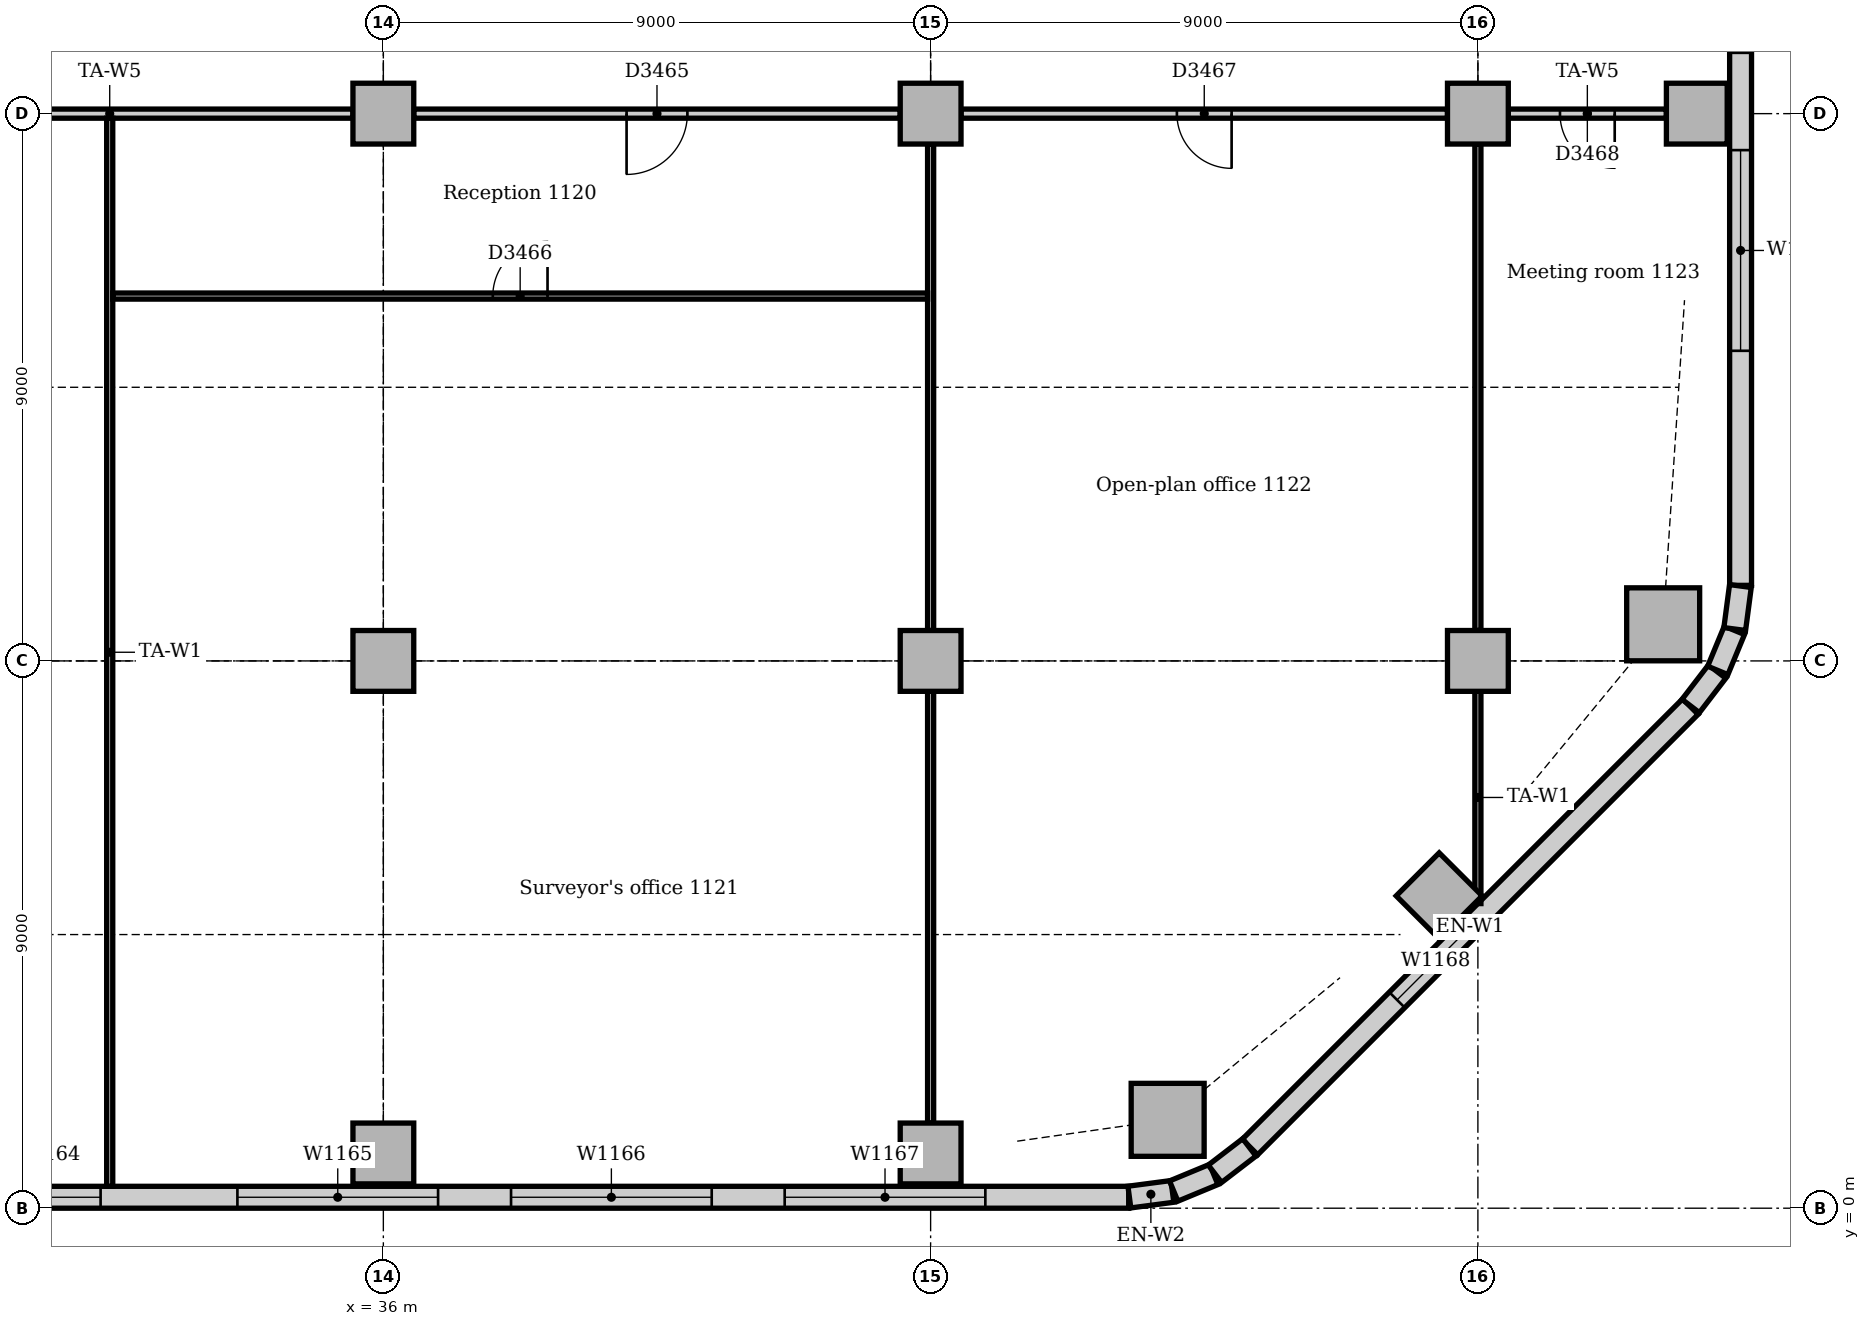
"""IFC4 building model, lengths in metres.
Left out: names, types, materials, properties, quantities, classifications, styles, units other than length and angle.
Written with IfcOpenShell. Run it as: python <this file> out.ifc"""

import sys

from ifc_helpers import new_model, si_unit, direction, frame, frame_2d, origin, origin_2d, place, context, subcontext, project, spatial, rectangle, extrude, element, fill, save


model = new_model("IFC4")
c1 = context("Model", 3, precision=1e-05, world=origin(), true_north=direction((0.0, 1.0)))
c2 = subcontext(c1, "Body", "Model", "MODEL_VIEW")
j1 = project(units=[si_unit("LENGTHUNIT", "METRE"), si_unit("PLANEANGLEUNIT", "RADIAN")], contexts=[c1])
p1 = place(None, origin())
s1 = spatial("IfcSite", under=j1, at=p1, CompositionType="ELEMENT")
p2 = place(p1, origin())
s2 = spatial("IfcBuilding", under=s1, at=p2, CompositionType="ELEMENT")
p3 = place(p2, frame((0.0, 0.0, 51.0)))
s3 = spatial("IfcBuildingStorey", under=s2, at=p3, CompositionType="ELEMENT", Elevation=51.0)
for number, where, z_axis, x_axis in (
    (1, (48.898, 1.453, 0.0), (0.0, 0.0, 1.0), (1.0, 0.0, 0.0)),
    (2, (57.047, 9.602, 0.0), (0.0, 0.0, 1.0), (1.0, 0.0, 0.0)),
):
    element("IfcColumn", number, at=place(p3, frame(where, z_axis=z_axis, x_axis=x_axis)), inside=s3, PredefinedType="COLUMN", context=c2, shape_type="SweptSolid", body=[
        extrude(rectangle(XDim=1.2, YDim=1.2, at=origin_2d()), origin(), (0.0, 0.0, 1.0), 3.85),
    ])
for number, where, z_axis, x_axis in (
    (3, (36.0, 0.9, 0.0), (0.0, 0.0, 1.0), (1.0, 0.0, 0.0)),
    (4, (45.0, 0.9, 0.0), (0.0, 0.0, 1.0), (1.0, 0.0, 0.0)),
    (5, (53.364, 5.136, 0.0), (0.0, 0.0, 1.0), (0.707, 0.707, 0.0)),
    (6, (57.6, 18.0, 0.0), (0.0, 0.0, 1.0), (1.0, 0.0, 0.0)),
    (7, (36.0, 9.0, 0.0), (0.0, 0.0, 1.0), (1.0, 0.0, 0.0)),
    (8, (36.0, 18.0, 0.0), (0.0, 0.0, 1.0), (1.0, 0.0, 0.0)),
    (9, (45.0, 9.0, 0.0), (0.0, 0.0, 1.0), (1.0, 0.0, 0.0)),
    (10, (45.0, 18.0, 0.0), (0.0, 0.0, 1.0), (1.0, 0.0, 0.0)),
    (11, (54.0, 9.0, 0.0), (0.0, 0.0, 1.0), (1.0, 0.0, 0.0)),
    (12, (54.0, 18.0, 0.0), (0.0, 0.0, 1.0), (1.0, 0.0, 0.0)),
):
    element("IfcColumn", number, at=place(p3, frame(where, z_axis=z_axis, x_axis=x_axis)), inside=s3, PredefinedType="COLUMN", context=c2, shape_type="SweptSolid", body=[
        extrude(rectangle(XDim=1.0, YDim=1.0, at=origin_2d()), origin(), (0.0, 0.0, 1.0), 3.85),
    ])
p4 = place(p3, frame((4.243, 0.18, 0.0), z_axis=(0.0, 0.0, 1.0), x_axis=(1.0, 0.0, 0.0)))
e13 = element("IfcWall", 13, at=p4, inside=s3, PredefinedType="STANDARD", context=c2, shape_type="SweptSolid", body=[
    extrude(rectangle(XDim=44.015, YDim=0.36, at=frame_2d((22.007, 0.0))), origin(), (0.0, 0.0, 1.0), 3.85),
])
p5 = place(p4, frame((2.357, 0.0, 0.9)))
e14 = element("IfcOpeningElement", 14, at=p5, cuts=e13, PredefinedType="OPENING", context=c2, shape_type="SweptSolid", body=[
    extrude(rectangle(XDim=3.3, YDim=1.6, at=frame_2d((1.65, 0.8))), frame((0.0, 0.19, 0.0), z_axis=(0.0, -1.0, 0.0), x_axis=(1.0, 0.0, 0.0)), (0.0, 0.0, 1.0), 0.38),
])
p6 = place(p4, frame((7.307, 0.0, 0.9)))
e15 = element("IfcOpeningElement", 15, at=p6, cuts=e13, PredefinedType="OPENING", context=c2, shape_type="SweptSolid", body=[
    extrude(rectangle(XDim=1.8, YDim=1.6, at=frame_2d((0.9, 0.8))), frame((0.0, 0.19, 0.0), z_axis=(0.0, -1.0, 0.0), x_axis=(1.0, 0.0, 0.0)), (0.0, 0.0, 1.0), 0.38),
])
p7 = place(p4, frame((11.357, 0.0, 0.9)))
e16 = element("IfcOpeningElement", 16, at=p7, cuts=e13, PredefinedType="OPENING", context=c2, shape_type="SweptSolid", body=[
    extrude(rectangle(XDim=3.3, YDim=1.6, at=frame_2d((1.65, 0.8))), frame((0.0, 0.19, 0.0), z_axis=(0.0, -1.0, 0.0), x_axis=(1.0, 0.0, 0.0)), (0.0, 0.0, 1.0), 0.38),
])
p8 = place(p4, frame((15.857, 0.0, 0.9)))
e17 = element("IfcOpeningElement", 17, at=p8, cuts=e13, PredefinedType="OPENING", context=c2, shape_type="SweptSolid", body=[
    extrude(rectangle(XDim=3.3, YDim=1.6, at=frame_2d((1.65, 0.8))), frame((0.0, 0.19, 0.0), z_axis=(0.0, -1.0, 0.0), x_axis=(1.0, 0.0, 0.0)), (0.0, 0.0, 1.0), 0.38),
])
p9 = place(p4, frame((20.357, 0.0, 0.9)))
e18 = element("IfcOpeningElement", 18, at=p9, cuts=e13, PredefinedType="OPENING", context=c2, shape_type="SweptSolid", body=[
    extrude(rectangle(XDim=3.3, YDim=1.6, at=frame_2d((1.65, 0.8))), frame((0.0, 0.19, 0.0), z_axis=(0.0, -1.0, 0.0), x_axis=(1.0, 0.0, 0.0)), (0.0, 0.0, 1.0), 0.38),
])
p10 = place(p4, frame((25.307, 0.0, 0.9)))
e19 = element("IfcOpeningElement", 19, at=p10, cuts=e13, PredefinedType="OPENING", context=c2, shape_type="SweptSolid", body=[
    extrude(rectangle(XDim=1.8, YDim=1.6, at=frame_2d((0.9, 0.8))), frame((0.0, 0.19, 0.0), z_axis=(0.0, -1.0, 0.0), x_axis=(1.0, 0.0, 0.0)), (0.0, 0.0, 1.0), 0.38),
])
p11 = place(p4, frame((29.357, 0.0, 0.9)))
e20 = element("IfcOpeningElement", 20, at=p11, cuts=e13, PredefinedType="OPENING", context=c2, shape_type="SweptSolid", body=[
    extrude(rectangle(XDim=3.3, YDim=1.6, at=frame_2d((1.65, 0.8))), frame((0.0, 0.19, 0.0), z_axis=(0.0, -1.0, 0.0), x_axis=(1.0, 0.0, 0.0)), (0.0, 0.0, 1.0), 0.38),
])
p12 = place(p4, frame((33.857, 0.0, 0.9)))
e21 = element("IfcOpeningElement", 21, at=p12, cuts=e13, PredefinedType="OPENING", context=c2, shape_type="SweptSolid", body=[
    extrude(rectangle(XDim=3.3, YDim=1.6, at=frame_2d((1.65, 0.8))), frame((0.0, 0.19, 0.0), z_axis=(0.0, -1.0, 0.0), x_axis=(1.0, 0.0, 0.0)), (0.0, 0.0, 1.0), 0.38),
])
p13 = place(p4, frame((38.357, 0.0, 0.9)))
e22 = element("IfcOpeningElement", 22, at=p13, cuts=e13, PredefinedType="OPENING", context=c2, shape_type="SweptSolid", body=[
    extrude(rectangle(XDim=3.3, YDim=1.6, at=frame_2d((1.65, 0.8))), frame((0.0, 0.19, 0.0), z_axis=(0.0, -1.0, 0.0), x_axis=(1.0, 0.0, 0.0)), (0.0, 0.0, 1.0), 0.38),
])
p14 = place(p3, frame((50.251, 1.006, 0.0), z_axis=(0.0, 0.0, 1.0), x_axis=(0.707106781187, 0.707106781187, 0.0)))
e23 = element("IfcWall", 23, at=p14, inside=s3, PredefinedType="STANDARD", context=c2, shape_type="SweptSolid", body=[
    extrude(rectangle(XDim=10.243, YDim=0.36, at=frame_2d((5.121, 0.0))), origin(), (0.0, 0.0, 1.0), 3.85),
])
p15 = place(p14, frame((3.421, 0.0, 0.9)))
e24 = element("IfcOpeningElement", 24, at=p15, cuts=e23, PredefinedType="OPENING", context=c2, shape_type="SweptSolid", body=[
    extrude(rectangle(XDim=1.8, YDim=1.6, at=frame_2d((0.9, 0.8))), frame((0.0, 0.19, 0.0), z_axis=(0.0, -1.0, 0.0), x_axis=(1.0, 0.0, 0.0)), (0.0, 0.0, 1.0), 0.38),
])
p16 = place(p3, frame((58.32, 10.243, 0.0), z_axis=(0.0, 0.0, 1.0), x_axis=(0.0, 1.0, 0.0)))
e25 = element("IfcWall", 25, at=p16, inside=s3, PredefinedType="STANDARD", context=c2, shape_type="SweptSolid", body=[
    extrude(rectangle(XDim=24.515, YDim=0.36, at=frame_2d((12.257, 0.0))), origin(), (0.0, 0.0, 1.0), 3.85),
])
p17 = place(p16, frame((3.857, 0.0, 0.9)))
e26 = element("IfcOpeningElement", 26, at=p17, cuts=e25, PredefinedType="OPENING", context=c2, shape_type="SweptSolid", body=[
    extrude(rectangle(XDim=3.3, YDim=1.6, at=frame_2d((1.65, 0.8))), frame((0.0, 0.19, 0.0), z_axis=(0.0, -1.0, 0.0), x_axis=(1.0, 0.0, 0.0)), (0.0, 0.0, 1.0), 0.38),
])
p18 = place(p16, frame((8.757, 0.0, 0.9)))
e27 = element("IfcOpeningElement", 27, at=p18, cuts=e25, PredefinedType="OPENING", context=c2, shape_type="SweptSolid", body=[
    extrude(rectangle(XDim=1.8, YDim=1.6, at=frame_2d((0.9, 0.8))), frame((0.0, 0.19, 0.0), z_axis=(0.0, -1.0, 0.0), x_axis=(1.0, 0.0, 0.0)), (0.0, 0.0, 1.0), 0.38),
])
p19 = place(p16, frame((12.857, 0.0, 0.9)))
e28 = element("IfcOpeningElement", 28, at=p19, cuts=e25, PredefinedType="OPENING", context=c2, shape_type="SweptSolid", body=[
    extrude(rectangle(XDim=3.3, YDim=1.6, at=frame_2d((1.65, 0.8))), frame((0.0, 0.19, 0.0), z_axis=(0.0, -1.0, 0.0), x_axis=(1.0, 0.0, 0.0)), (0.0, 0.0, 1.0), 0.38),
])
p20 = place(p16, frame((17.357, 0.0, 0.9)))
e29 = element("IfcOpeningElement", 29, at=p20, cuts=e25, PredefinedType="OPENING", context=c2, shape_type="SweptSolid", body=[
    extrude(rectangle(XDim=3.3, YDim=1.6, at=frame_2d((1.65, 0.8))), frame((0.0, 0.19, 0.0), z_axis=(0.0, -1.0, 0.0), x_axis=(1.0, 0.0, 0.0)), (0.0, 0.0, 1.0), 0.38),
])
for number, where, z_axis, x_axis in (
    (30, (48.269, 0.183, 0.0), (0.0, 0.0, 1.0), (0.991, 0.131, 0.0)),
    (31, (48.997, 0.282, 0.0), (0.0, 0.0, 1.0), (0.924, 0.383, 0.0)),
):
    element("IfcWall", number, at=place(p3, frame(where, z_axis=z_axis, x_axis=x_axis)), inside=s3, PredefinedType="STANDARD", context=c2, shape_type="SweptSolid", body=[
        extrude(rectangle(XDim=0.713, YDim=0.36, at=frame_2d((0.356, 0.0))), origin(), (0.0, 0.0, 1.0), 3.85),
    ])
for number, where, z_axis, x_axis in (
    (32, (49.675, 0.566, 0.0), (0.0, 0.0, 1.0), (0.793, 0.609, 0.0)),
    (33, (57.5, 8.259, 0.0), (0.0, 0.0, 1.0), (0.609, 0.793, 0.0)),
):
    element("IfcWall", number, at=place(p3, frame(where, z_axis=z_axis, x_axis=x_axis)), inside=s3, PredefinedType="STANDARD", context=c2, shape_type="SweptSolid", body=[
        extrude(rectangle(XDim=0.713, YDim=0.36, at=frame_2d((0.357, 0.0))), origin(), (0.0, 0.0, 1.0), 3.85),
    ])
for number, where, z_axis, x_axis in (
    (34, (57.945, 8.844, 0.0), (0.0, 0.0, 1.0), (0.383, 0.924, 0.0)),
    (35, (58.224, 9.524, 0.0), (0.0, 0.0, 1.0), (0.131, 0.991, 0.0)),
):
    element("IfcWall", number, at=place(p3, frame(where, z_axis=z_axis, x_axis=x_axis)), inside=s3, PredefinedType="STANDARD", context=c2, shape_type="SweptSolid", body=[
        extrude(rectangle(XDim=0.713, YDim=0.36, at=frame_2d((0.356, 0.0))), origin(), (0.0, 0.0, 1.0), 3.85),
    ])
p21 = place(p3, frame((54.5, 18.0, 0.0), z_axis=(0.0, 0.0, 1.0), x_axis=(1.0, 0.0, 0.0)))
e36 = element("IfcWall", 36, at=p21, inside=s3, PredefinedType="PARTITIONING", context=c2, shape_type="SweptSolid", body=[
    extrude(rectangle(XDim=2.6, YDim=0.15, at=frame_2d((1.3, 0.0))), origin(), (0.0, 0.0, 1.0), 3.602),
])
p22 = place(p21, frame((0.85, 0.0, 0.0)))
e37 = element("IfcOpeningElement", 37, at=p22, cuts=e36, PredefinedType="OPENING", context=c2, shape_type="SweptSolid", body=[
    extrude(rectangle(XDim=0.9, YDim=2.1, at=frame_2d((0.45, 1.05))), frame((0.0, 0.085, 0.0), z_axis=(0.0, -1.0, 0.0), x_axis=(1.0, 0.0, 0.0)), (0.0, 0.0, 1.0), 0.17),
])
p23 = place(p3, frame((45.5, 18.0, 0.0), z_axis=(0.0, 0.0, 1.0), x_axis=(1.0, 0.0, 0.0)))
e38 = element("IfcWall", 38, at=p23, inside=s3, PredefinedType="PARTITIONING", context=c2, shape_type="SweptSolid", body=[
    extrude(rectangle(XDim=8.0, YDim=0.15, at=frame_2d((4.0, 0.0))), origin(), (0.0, 0.0, 1.0), 3.15),
])
p24 = place(p23, frame((3.55, 0.0, 0.0)))
e39 = element("IfcOpeningElement", 39, at=p24, cuts=e38, PredefinedType="OPENING", context=c2, shape_type="SweptSolid", body=[
    extrude(rectangle(XDim=0.9, YDim=2.1, at=frame_2d((0.45, 1.05))), frame((0.0, 0.085, 0.0), z_axis=(0.0, -1.0, 0.0), x_axis=(1.0, 0.0, 0.0)), (0.0, 0.0, 1.0), 0.17),
])
p25 = place(p3, frame((36.5, 18.0, 0.0), z_axis=(0.0, 0.0, 1.0), x_axis=(1.0, 0.0, 0.0)))
e40 = element("IfcWall", 40, at=p25, inside=s3, PredefinedType="PARTITIONING", context=c2, shape_type="SweptSolid", body=[
    extrude(rectangle(XDim=8.0, YDim=0.15, at=frame_2d((4.0, 0.0))), origin(), (0.0, 0.0, 1.0), 3.15),
])
p26 = place(p25, frame((3.5, 0.0, 0.0)))
e41 = element("IfcOpeningElement", 41, at=p26, cuts=e40, PredefinedType="OPENING", context=c2, shape_type="SweptSolid", body=[
    extrude(rectangle(XDim=1.0, YDim=2.1, at=frame_2d((0.5, 1.05))), frame((0.0, 0.085, 0.0), z_axis=(0.0, -1.0, 0.0), x_axis=(1.0, 0.0, 0.0)), (0.0, 0.0, 1.0), 0.17),
])
p27 = place(p3, frame((27.5, 18.0, 0.0), z_axis=(0.0, 0.0, 1.0), x_axis=(1.0, 0.0, 0.0)))
e42 = element("IfcWall", 42, at=p27, inside=s3, PredefinedType="PARTITIONING", context=c2, shape_type="SweptSolid", body=[
    extrude(rectangle(XDim=8.0, YDim=0.15, at=frame_2d((4.0, 0.0))), origin(), (0.0, 0.0, 1.0), 3.15),
])
p28 = place(p3, frame((31.5, 0.36, 0.0), z_axis=(0.0, 0.0, 1.0), x_axis=(0.0, 1.0, 0.0)))
e43 = element("IfcWall", 43, at=p28, inside=s3, PredefinedType="PARTITIONING", context=c2, shape_type="SweptSolid", body=[
    extrude(rectangle(XDim=17.565, YDim=0.1, at=frame_2d((8.783, 0.0))), origin(), (0.0, 0.0, 1.0), 3.85),
])
p29 = place(p3, frame((45.0, 1.4, 0.0), z_axis=(0.0, 0.0, 1.0), x_axis=(0.0, 1.0, 0.0)))
e44 = element("IfcWall", 44, at=p29, inside=s3, PredefinedType="PARTITIONING", context=c2, shape_type="SweptSolid", body=[
    extrude(rectangle(XDim=7.1, YDim=0.1, at=frame_2d((3.55, 0.0))), origin(), (0.0, 0.0, 1.0), 3.158),
])
p30 = place(p3, frame((45.0, 9.5, 0.0), z_axis=(0.0, 0.0, 1.0), x_axis=(0.0, 1.0, 0.0)))
e45 = element("IfcWall", 45, at=p30, inside=s3, PredefinedType="PARTITIONING", context=c2, shape_type="SweptSolid", body=[
    extrude(rectangle(XDim=8.0, YDim=0.1, at=frame_2d((4.0, 0.0))), origin(), (0.0, 0.0, 1.0), 3.158),
])
p31 = place(p3, frame((31.55, 15.0, 0.0), z_axis=(0.0, 0.0, 1.0), x_axis=(1.0, 0.0, 0.0)))
e46 = element("IfcWall", 46, at=p31, inside=s3, PredefinedType="PARTITIONING", context=c2, shape_type="SweptSolid", body=[
    extrude(rectangle(XDim=13.4, YDim=0.1, at=frame_2d((6.7, 0.0))), origin(), (0.0, 0.0, 1.0), 3.85),
])
p32 = place(p31, frame((6.25, 0.0, 0.0)))
e47 = element("IfcOpeningElement", 47, at=p32, cuts=e46, PredefinedType="OPENING", context=c2, shape_type="SweptSolid", body=[
    extrude(rectangle(XDim=0.9, YDim=2.1, at=frame_2d((0.45, 1.05))), frame((0.0, 0.06, 0.0), z_axis=(0.0, -1.0, 0.0), x_axis=(1.0, 0.0, 0.0)), (0.0, 0.0, 1.0), 0.12),
])
p33 = place(p3, frame((54.0, 5.009, 0.0), z_axis=(0.0, 0.0, 1.0), x_axis=(0.0, 1.0, 0.0)))
e48 = element("IfcWall", 48, at=p33, inside=s3, PredefinedType="PARTITIONING", context=c2, shape_type="SweptSolid", body=[
    extrude(rectangle(XDim=3.491, YDim=0.1, at=frame_2d((1.745, 0.0))), origin(), (0.0, 0.0, 1.0), 3.652),
])
p34 = place(p3, frame((54.0, 9.5, 0.0), z_axis=(0.0, 0.0, 1.0), x_axis=(0.0, 1.0, 0.0)))
e49 = element("IfcWall", 49, at=p34, inside=s3, PredefinedType="PARTITIONING", context=c2, shape_type="SweptSolid", body=[
    extrude(rectangle(XDim=8.0, YDim=0.1, at=frame_2d((4.0, 0.0))), origin(), (0.0, 0.0, 1.0), 3.158),
])
p35 = place(p10, origin())
e50 = element("IfcWindow", 50, at=p35, inside=s3, PartitioningType="SINGLE_PANEL", PredefinedType="WINDOW", context=c2, shape_type="SweptSolid", body=[
    extrude(rectangle(XDim=1.8, YDim=1.6, at=frame_2d((0.9, 0.8))), frame((0.0, 0.13, 0.0), z_axis=(0.0, -1.0, 0.0), x_axis=(1.0, 0.0, 0.0)), (0.0, 0.0, 1.0), 0.06),
])
fill(e19, e50)
p36 = place(p11, origin())
e51 = element("IfcWindow", 51, at=p36, inside=s3, PartitioningType="SINGLE_PANEL", PredefinedType="WINDOW", context=c2, shape_type="SweptSolid", body=[
    extrude(rectangle(XDim=3.3, YDim=1.6, at=frame_2d((1.65, 0.8))), frame((0.0, 0.13, 0.0), z_axis=(0.0, -1.0, 0.0), x_axis=(1.0, 0.0, 0.0)), (0.0, 0.0, 1.0), 0.06),
])
fill(e20, e51)
p37 = place(p12, origin())
e52 = element("IfcWindow", 52, at=p37, inside=s3, PartitioningType="SINGLE_PANEL", PredefinedType="WINDOW", context=c2, shape_type="SweptSolid", body=[
    extrude(rectangle(XDim=3.3, YDim=1.6, at=frame_2d((1.65, 0.8))), frame((0.0, 0.13, 0.0), z_axis=(0.0, -1.0, 0.0), x_axis=(1.0, 0.0, 0.0)), (0.0, 0.0, 1.0), 0.06),
])
fill(e21, e52)
p38 = place(p13, origin())
e53 = element("IfcWindow", 53, at=p38, inside=s3, PartitioningType="SINGLE_PANEL", PredefinedType="WINDOW", context=c2, shape_type="SweptSolid", body=[
    extrude(rectangle(XDim=3.3, YDim=1.6, at=frame_2d((1.65, 0.8))), frame((0.0, 0.13, 0.0), z_axis=(0.0, -1.0, 0.0), x_axis=(1.0, 0.0, 0.0)), (0.0, 0.0, 1.0), 0.06),
])
fill(e22, e53)
p39 = place(p15, origin())
e54 = element("IfcWindow", 54, at=p39, inside=s3, PartitioningType="SINGLE_PANEL", PredefinedType="WINDOW", context=c2, shape_type="SweptSolid", body=[
    extrude(rectangle(XDim=1.8, YDim=1.6, at=frame_2d((0.9, 0.8))), frame((0.0, 0.13, 0.0), z_axis=(0.0, -1.0, 0.0), x_axis=(1.0, 0.0, 0.0)), (0.0, 0.0, 1.0), 0.06),
])
fill(e24, e54)
p40 = place(p17, origin())
e55 = element("IfcWindow", 55, at=p40, inside=s3, PartitioningType="SINGLE_PANEL", PredefinedType="WINDOW", context=c2, shape_type="SweptSolid", body=[
    extrude(rectangle(XDim=3.3, YDim=1.6, at=frame_2d((1.65, 0.8))), frame((0.0, 0.13, 0.0), z_axis=(0.0, -1.0, 0.0), x_axis=(1.0, 0.0, 0.0)), (0.0, 0.0, 1.0), 0.06),
])
fill(e26, e55)
p41 = place(p26, frame((1.0, 0.0, 0.0), z_axis=(0.0, 0.0, 1.0), x_axis=(-1.0, 0.0, 0.0)))
e56 = element("IfcDoor", 56, at=p41, inside=s3, OperationType="SINGLE_SWING_RIGHT", PredefinedType="DOOR", context=c2, shape_type="SweptSolid", body=[
    extrude(rectangle(XDim=1.0, YDim=2.1, at=frame_2d((0.5, 1.05))), frame((0.0, 0.025, 0.0), z_axis=(0.0, -1.0, 0.0), x_axis=(1.0, 0.0, 0.0)), (0.0, 0.0, 1.0), 0.05),
])
fill(e41, e56)
p42 = place(p32, origin())
e57 = element("IfcDoor", 57, at=p42, inside=s3, OperationType="SINGLE_SWING_RIGHT", PredefinedType="DOOR", context=c2, shape_type="SweptSolid", body=[
    extrude(rectangle(XDim=0.9, YDim=2.1, at=frame_2d((0.45, 1.05))), frame((0.0, 0.025, 0.0), z_axis=(0.0, -1.0, 0.0), x_axis=(1.0, 0.0, 0.0)), (0.0, 0.0, 1.0), 0.05),
])
fill(e47, e57)
p43 = place(p24, frame((0.9, 0.0, 0.0), z_axis=(0.0, 0.0, 1.0), x_axis=(-1.0, 0.0, 0.0)))
e58 = element("IfcDoor", 58, at=p43, inside=s3, OperationType="SINGLE_SWING_LEFT", PredefinedType="DOOR", context=c2, shape_type="SweptSolid", body=[
    extrude(rectangle(XDim=0.9, YDim=2.1, at=frame_2d((0.45, 1.05))), frame((0.0, 0.025, 0.0), z_axis=(0.0, -1.0, 0.0), x_axis=(1.0, 0.0, 0.0)), (0.0, 0.0, 1.0), 0.05),
])
fill(e39, e58)
p44 = place(p22, frame((0.9, 0.0, 0.0), z_axis=(0.0, 0.0, 1.0), x_axis=(-1.0, 0.0, 0.0)))
e59 = element("IfcDoor", 59, at=p44, inside=s3, OperationType="SINGLE_SWING_LEFT", PredefinedType="DOOR", context=c2, shape_type="SweptSolid", body=[
    extrude(rectangle(XDim=0.9, YDim=2.1, at=frame_2d((0.45, 1.05))), frame((0.0, 0.025, 0.0), z_axis=(0.0, -1.0, 0.0), x_axis=(1.0, 0.0, 0.0)), (0.0, 0.0, 1.0), 0.05),
])
fill(e37, e59)
save(model, sys.argv[1])
